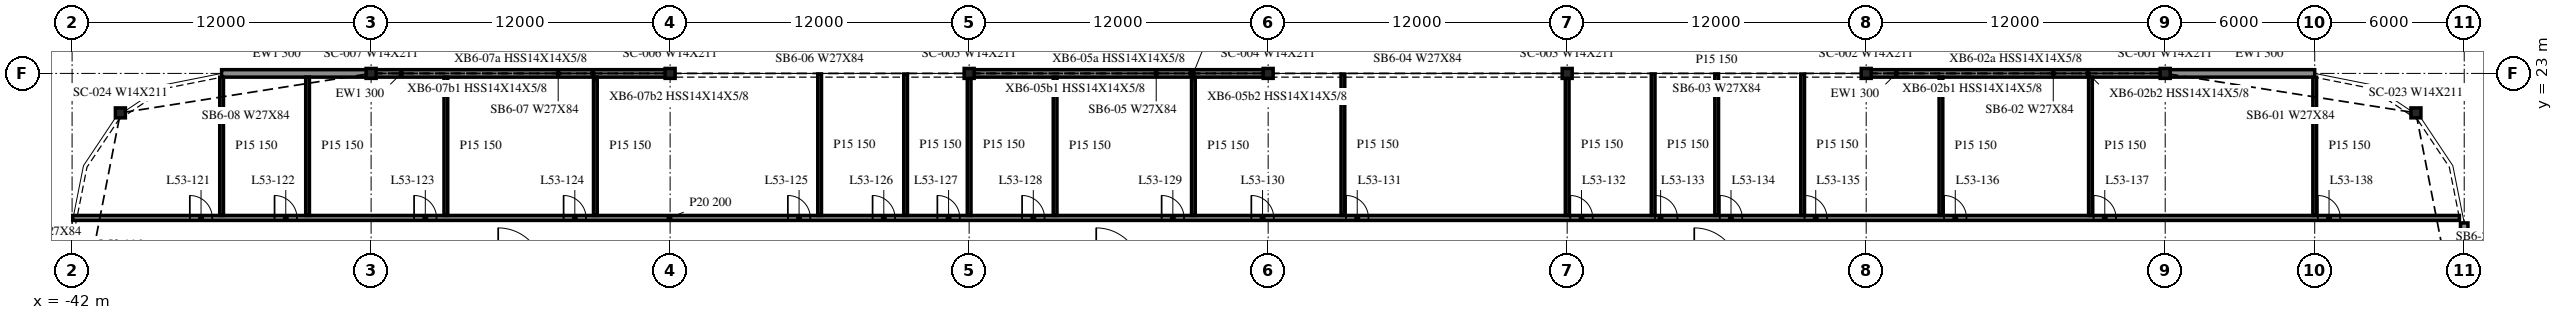
"""IFC4 building model, lengths in metres.
Left out: names, types, materials, properties, quantities, classifications, styles, units other than length and angle.
Written with IfcOpenShell. Run it as: python <this file> out.ifc"""

import sys

from ifc_helpers import new_model, si_unit, direction, frame, frame_2d, origin, origin_2d, place, context, subcontext, project, spatial, rectangle, i_section, extrude, element, fill, save


model = new_model("IFC4")
c1 = context("Model", 3, precision=1e-05, world=origin(), true_north=direction((0.0, 1.0)))
c2 = subcontext(c1, "Body", "Model", "MODEL_VIEW")
j1 = project(units=[si_unit("LENGTHUNIT", "METRE"), si_unit("PLANEANGLEUNIT", "RADIAN")], contexts=[c1])
p1 = place(None, origin())
s1 = spatial("IfcSite", under=j1, at=p1, CompositionType="ELEMENT")
p2 = place(p1, origin())
s2 = spatial("IfcBuilding", under=s1, at=p2, CompositionType="ELEMENT")
p3 = place(p2, frame((0.0, 0.0, 220.5)))
s3 = spatial("IfcBuildingStorey", under=s2, at=p3, CompositionType="ELEMENT", Elevation=220.5)
for number, where, z_axis, x_axis in (
    (1, (52.062, 21.416, -0.34), (0.0, 0.0, 1.0), (1.0, 0.0, 0.0)),
    (2, (42.0, 23.0, -0.34), (0.0, 0.0, 1.0), (1.0, 0.0, 0.0)),
    (3, (30.0, 23.0, -0.34), (0.0, 0.0, 1.0), (1.0, 0.0, 0.0)),
    (4, (18.0, 23.0, -0.34), (0.0, 0.0, 1.0), (1.0, 0.0, 0.0)),
    (5, (6.0, 23.0, -0.34), (0.0, 0.0, 1.0), (1.0, 0.0, 0.0)),
    (6, (-6.0, 23.0, -0.34), (0.0, 0.0, 1.0), (1.0, 0.0, 0.0)),
    (7, (-18.0, 23.0, -0.34), (0.0, 0.0, 1.0), (1.0, 0.0, 0.0)),
    (8, (-30.0, 23.0, -0.34), (0.0, 0.0, 1.0), (1.0, 0.0, 0.0)),
    (9, (-40.062, 21.416, -0.34), (0.0, 0.0, 1.0), (1.0, 0.0, 0.0)),
):
    element("IfcColumn", number, at=place(p3, frame(where, z_axis=z_axis, x_axis=x_axis)), inside=s3, PredefinedType="COLUMN", context=c2, shape_type="SweptSolid", body=[
        extrude(i_section(OverallWidth=0.401, OverallDepth=0.399, WebThickness=0.025, FlangeThickness=0.04, at=origin_2d()), origin(), (0.0, 0.0, 1.0), 3.74),
    ])
p4 = place(p3, frame((48.0, 23.0, 0.0), z_axis=(0.0, 0.0, 1.0), x_axis=(-1.0, 0.0, 0.0)))
e10 = element("IfcWall", 10, at=p4, inside=s3, PredefinedType="NOTDEFINED", context=c2, shape_type="SweptSolid", body=[
    extrude(rectangle(XDim=5.988, YDim=0.3, at=frame_2d((2.994, 0.0))), origin(), (0.0, 0.0, 1.0), 3.4),
])
for number, where, z_axis, x_axis in (
    (11, (41.988, 23.0, 0.0), (0.0, 0.0, 1.0), (-1.0, 0.0, 0.0)),
    (12, (5.988, 23.0, 0.0), (0.0, 0.0, 1.0), (-1.0, 0.0, 0.0)),
    (13, (-18.012, 23.0, 0.0), (0.0, 0.0, 1.0), (-1.0, 0.0, 0.0)),
):
    element("IfcWall", number, at=place(p3, frame(where, z_axis=z_axis, x_axis=x_axis)), inside=s3, PredefinedType="NOTDEFINED", context=c2, shape_type="SweptSolid", body=[
        extrude(rectangle(XDim=11.975, YDim=0.3, at=frame_2d((5.988, 0.0))), origin(), (0.0, 0.0, 1.0), 3.4),
    ])
p5 = place(p3, frame((-30.012, 23.0, 0.0), z_axis=(0.0, 0.0, 1.0), x_axis=(-1.0, 0.0, 0.0)))
e14 = element("IfcWall", 14, at=p5, inside=s3, PredefinedType="NOTDEFINED", context=c2, shape_type="SweptSolid", body=[
    extrude(rectangle(XDim=5.988, YDim=0.3, at=frame_2d((2.994, 0.0))), origin(), (0.0, 0.0, 1.0), 3.4),
])
p6 = place(p3, frame((54.0, 11.7, 0.0), z_axis=(0.0, 0.0, 1.0), x_axis=(0.0, 1.0, 0.0)))
e15 = element("IfcWall", 15, at=p6, inside=s3, PredefinedType="NOTDEFINED", context=c2, shape_type="SweptSolid", body=[
    extrude(rectangle(XDim=5.3, YDim=0.3, at=frame_2d((2.65, 0.0))), origin(), (0.0, 0.0, 1.0), 3.4),
])
p7 = place(p3, frame((-41.975, 17.2, 0.0), z_axis=(0.0, 0.0, 1.0), x_axis=(1.0, 0.0, 0.0)))
e16 = element("IfcWall", 16, at=p7, inside=s3, PredefinedType="PARTITIONING", context=c2, shape_type="SweptSolid", body=[
    extrude(rectangle(XDim=95.782, YDim=0.2, at=frame_2d((47.891, 0.0))), origin(), (0.0, 0.0, 1.0), 3.4),
])
p8 = place(p7, frame((4.7, 0.0, 0.0)))
e17 = element("IfcOpeningElement", 17, at=p8, cuts=e16, PredefinedType="OPENING", context=c2, shape_type="SweptSolid", body=[
    extrude(rectangle(XDim=0.9, YDim=2.1, at=frame_2d((0.45, 1.05))), frame((0.0, 0.11, 0.0), z_axis=(0.0, -1.0, 0.0), x_axis=(1.0, 0.0, 0.0)), (0.0, 0.0, 1.0), 0.22),
])
p9 = place(p7, frame((8.1, 0.0, 0.0)))
e18 = element("IfcOpeningElement", 18, at=p9, cuts=e16, PredefinedType="OPENING", context=c2, shape_type="SweptSolid", body=[
    extrude(rectangle(XDim=0.9, YDim=2.1, at=frame_2d((0.45, 1.05))), frame((0.0, 0.11, 0.0), z_axis=(0.0, -1.0, 0.0), x_axis=(1.0, 0.0, 0.0)), (0.0, 0.0, 1.0), 0.22),
])
p10 = place(p7, frame((13.7, 0.0, 0.0)))
e19 = element("IfcOpeningElement", 19, at=p10, cuts=e16, PredefinedType="OPENING", context=c2, shape_type="SweptSolid", body=[
    extrude(rectangle(XDim=0.9, YDim=2.1, at=frame_2d((0.45, 1.05))), frame((0.0, 0.11, 0.0), z_axis=(0.0, -1.0, 0.0), x_axis=(1.0, 0.0, 0.0)), (0.0, 0.0, 1.0), 0.22),
])
p11 = place(p7, frame((19.7, 0.0, 0.0)))
e20 = element("IfcOpeningElement", 20, at=p11, cuts=e16, PredefinedType="OPENING", context=c2, shape_type="SweptSolid", body=[
    extrude(rectangle(XDim=0.9, YDim=2.1, at=frame_2d((0.45, 1.05))), frame((0.0, 0.11, 0.0), z_axis=(0.0, -1.0, 0.0), x_axis=(1.0, 0.0, 0.0)), (0.0, 0.0, 1.0), 0.22),
])
p12 = place(p7, frame((28.7, 0.0, 0.0)))
e21 = element("IfcOpeningElement", 21, at=p12, cuts=e16, PredefinedType="OPENING", context=c2, shape_type="SweptSolid", body=[
    extrude(rectangle(XDim=0.9, YDim=2.1, at=frame_2d((0.45, 1.05))), frame((0.0, 0.11, 0.0), z_axis=(0.0, -1.0, 0.0), x_axis=(1.0, 0.0, 0.0)), (0.0, 0.0, 1.0), 0.22),
])
p13 = place(p7, frame((32.1, 0.0, 0.0)))
e22 = element("IfcOpeningElement", 22, at=p13, cuts=e16, PredefinedType="OPENING", context=c2, shape_type="SweptSolid", body=[
    extrude(rectangle(XDim=0.9, YDim=2.1, at=frame_2d((0.45, 1.05))), frame((0.0, 0.11, 0.0), z_axis=(0.0, -1.0, 0.0), x_axis=(1.0, 0.0, 0.0)), (0.0, 0.0, 1.0), 0.22),
])
p14 = place(p7, frame((34.7, 0.0, 0.0)))
e23 = element("IfcOpeningElement", 23, at=p14, cuts=e16, PredefinedType="OPENING", context=c2, shape_type="SweptSolid", body=[
    extrude(rectangle(XDim=0.9, YDim=2.1, at=frame_2d((0.45, 1.05))), frame((0.0, 0.11, 0.0), z_axis=(0.0, -1.0, 0.0), x_axis=(1.0, 0.0, 0.0)), (0.0, 0.0, 1.0), 0.22),
])
p15 = place(p7, frame((38.1, 0.0, 0.0)))
e24 = element("IfcOpeningElement", 24, at=p15, cuts=e16, PredefinedType="OPENING", context=c2, shape_type="SweptSolid", body=[
    extrude(rectangle(XDim=0.9, YDim=2.1, at=frame_2d((0.45, 1.05))), frame((0.0, 0.11, 0.0), z_axis=(0.0, -1.0, 0.0), x_axis=(1.0, 0.0, 0.0)), (0.0, 0.0, 1.0), 0.22),
])
p16 = place(p7, frame((43.7, 0.0, 0.0)))
e25 = element("IfcOpeningElement", 25, at=p16, cuts=e16, PredefinedType="OPENING", context=c2, shape_type="SweptSolid", body=[
    extrude(rectangle(XDim=0.9, YDim=2.1, at=frame_2d((0.45, 1.05))), frame((0.0, 0.11, 0.0), z_axis=(0.0, -1.0, 0.0), x_axis=(1.0, 0.0, 0.0)), (0.0, 0.0, 1.0), 0.22),
])
p17 = place(p7, frame((47.3, 0.0, 0.0)))
e26 = element("IfcOpeningElement", 26, at=p17, cuts=e16, PredefinedType="OPENING", context=c2, shape_type="SweptSolid", body=[
    extrude(rectangle(XDim=0.9, YDim=2.1, at=frame_2d((0.45, 1.05))), frame((0.0, 0.11, 0.0), z_axis=(0.0, -1.0, 0.0), x_axis=(1.0, 0.0, 0.0)), (0.0, 0.0, 1.0), 0.22),
])
p18 = place(p7, frame((51.1, 0.0, 0.0)))
e27 = element("IfcOpeningElement", 27, at=p18, cuts=e16, PredefinedType="OPENING", context=c2, shape_type="SweptSolid", body=[
    extrude(rectangle(XDim=0.9, YDim=2.1, at=frame_2d((0.45, 1.05))), frame((0.0, 0.11, 0.0), z_axis=(0.0, -1.0, 0.0), x_axis=(1.0, 0.0, 0.0)), (0.0, 0.0, 1.0), 0.22),
])
p19 = place(p7, frame((60.1, 0.0, 0.0)))
e28 = element("IfcOpeningElement", 28, at=p19, cuts=e16, PredefinedType="OPENING", context=c2, shape_type="SweptSolid", body=[
    extrude(rectangle(XDim=0.9, YDim=2.1, at=frame_2d((0.45, 1.05))), frame((0.0, 0.11, 0.0), z_axis=(0.0, -1.0, 0.0), x_axis=(1.0, 0.0, 0.0)), (0.0, 0.0, 1.0), 0.22),
])
p20 = place(p7, frame((63.5, 0.0, 0.0)))
e29 = element("IfcOpeningElement", 29, at=p20, cuts=e16, PredefinedType="OPENING", context=c2, shape_type="SweptSolid", body=[
    extrude(rectangle(XDim=0.9, YDim=2.1, at=frame_2d((0.45, 1.05))), frame((0.0, 0.11, 0.0), z_axis=(0.0, -1.0, 0.0), x_axis=(1.0, 0.0, 0.0)), (0.0, 0.0, 1.0), 0.22),
])
p21 = place(p7, frame((66.1, 0.0, 0.0)))
e30 = element("IfcOpeningElement", 30, at=p21, cuts=e16, PredefinedType="OPENING", context=c2, shape_type="SweptSolid", body=[
    extrude(rectangle(XDim=0.9, YDim=2.1, at=frame_2d((0.45, 1.05))), frame((0.0, 0.11, 0.0), z_axis=(0.0, -1.0, 0.0), x_axis=(1.0, 0.0, 0.0)), (0.0, 0.0, 1.0), 0.22),
])
p22 = place(p7, frame((69.5, 0.0, 0.0)))
e31 = element("IfcOpeningElement", 31, at=p22, cuts=e16, PredefinedType="OPENING", context=c2, shape_type="SweptSolid", body=[
    extrude(rectangle(XDim=0.9, YDim=2.1, at=frame_2d((0.45, 1.05))), frame((0.0, 0.11, 0.0), z_axis=(0.0, -1.0, 0.0), x_axis=(1.0, 0.0, 0.0)), (0.0, 0.0, 1.0), 0.22),
])
p23 = place(p7, frame((75.1, 0.0, 0.0)))
e32 = element("IfcOpeningElement", 32, at=p23, cuts=e16, PredefinedType="OPENING", context=c2, shape_type="SweptSolid", body=[
    extrude(rectangle(XDim=0.9, YDim=2.1, at=frame_2d((0.45, 1.05))), frame((0.0, 0.11, 0.0), z_axis=(0.0, -1.0, 0.0), x_axis=(1.0, 0.0, 0.0)), (0.0, 0.0, 1.0), 0.22),
])
p24 = place(p7, frame((81.1, 0.0, 0.0)))
e33 = element("IfcOpeningElement", 33, at=p24, cuts=e16, PredefinedType="OPENING", context=c2, shape_type="SweptSolid", body=[
    extrude(rectangle(XDim=0.9, YDim=2.1, at=frame_2d((0.45, 1.05))), frame((0.0, 0.11, 0.0), z_axis=(0.0, -1.0, 0.0), x_axis=(1.0, 0.0, 0.0)), (0.0, 0.0, 1.0), 0.22),
])
p25 = place(p7, frame((90.1, 0.0, 0.0)))
e34 = element("IfcOpeningElement", 34, at=p25, cuts=e16, PredefinedType="OPENING", context=c2, shape_type="SweptSolid", body=[
    extrude(rectangle(XDim=0.9, YDim=2.1, at=frame_2d((0.45, 1.05))), frame((0.0, 0.11, 0.0), z_axis=(0.0, -1.0, 0.0), x_axis=(1.0, 0.0, 0.0)), (0.0, 0.0, 1.0), 0.22),
])
p26 = place(p3, frame((-36.0, 17.3, 0.0), z_axis=(0.0, 0.0, 1.0), x_axis=(0.0, 1.0, 0.0)))
e35 = element("IfcWall", 35, at=p26, inside=s3, PredefinedType="PARTITIONING", context=c2, shape_type="SweptSolid", body=[
    extrude(rectangle(XDim=5.547, YDim=0.15, at=frame_2d((2.773, 0.0))), origin(), (0.0, 0.0, 1.0), 3.4),
])
for number, where, z_axis, x_axis in (
    (36, (-32.55, 17.3, 0.0), (0.0, 0.0, 1.0), (0.0, 1.0, 0.0)),
    (37, (-27.0, 17.3, 0.0), (0.0, 0.0, 1.0), (0.0, 1.0, 0.0)),
    (38, (-21.0, 17.3, 0.0), (0.0, 0.0, 1.0), (0.0, 1.0, 0.0)),
):
    element("IfcWall", number, at=place(p3, frame(where, z_axis=z_axis, x_axis=x_axis)), inside=s3, PredefinedType="PARTITIONING", context=c2, shape_type="SweptSolid", body=[
        extrude(rectangle(XDim=5.55, YDim=0.15, at=frame_2d((2.775, 0.0))), origin(), (0.0, 0.0, 1.0), 3.4),
    ])
for number, where, z_axis, x_axis in (
    (39, (-12.0, 17.3, 0.0), (0.0, 0.0, 1.0), (0.0, 1.0, 0.0)),
    (40, (-8.55, 17.3, 0.0), (0.0, 0.0, 1.0), (0.0, 1.0, 0.0)),
):
    element("IfcWall", number, at=place(p3, frame(where, z_axis=z_axis, x_axis=x_axis)), inside=s3, PredefinedType="PARTITIONING", context=c2, shape_type="SweptSolid", body=[
        extrude(rectangle(XDim=5.675, YDim=0.15, at=frame_2d((2.837, 0.0))), origin(), (0.0, 0.0, 1.0), 3.4),
    ])
p27 = place(p3, frame((-6.0, 17.3, 0.0), z_axis=(0.0, 0.0, 1.0), x_axis=(0.0, 1.0, 0.0)))
e41 = element("IfcWall", 41, at=p27, inside=s3, PredefinedType="PARTITIONING", context=c2, shape_type="SweptSolid", body=[
    extrude(rectangle(XDim=5.675, YDim=0.15, at=frame_2d((2.837, 0.0))), origin(), (0.0, 0.0, 1.0), 2.401),
])
for number, where, z_axis, x_axis in (
    (42, (-2.55, 17.3, 0.0), (0.0, 0.0, 1.0), (0.0, 1.0, 0.0)),
    (43, (3.0, 17.3, 0.0), (0.0, 0.0, 1.0), (0.0, 1.0, 0.0)),
):
    element("IfcWall", number, at=place(p3, frame(where, z_axis=z_axis, x_axis=x_axis)), inside=s3, PredefinedType="PARTITIONING", context=c2, shape_type="SweptSolid", body=[
        extrude(rectangle(XDim=5.55, YDim=0.15, at=frame_2d((2.775, 0.0))), origin(), (0.0, 0.0, 1.0), 3.4),
    ])
p28 = place(p3, frame((9.0, 17.3, 0.0), z_axis=(0.0, 0.0, 1.0), x_axis=(0.0, 1.0, 0.0)))
e44 = element("IfcWall", 44, at=p28, inside=s3, PredefinedType="PARTITIONING", context=c2, shape_type="SweptSolid", body=[
    extrude(rectangle(XDim=5.675, YDim=0.15, at=frame_2d((2.837, 0.0))), origin(), (0.0, 0.0, 1.0), 3.4),
])
p29 = place(p3, frame((18.0, 17.3, 0.0), z_axis=(0.0, 0.0, 1.0), x_axis=(0.0, 1.0, 0.0)))
e45 = element("IfcWall", 45, at=p29, inside=s3, PredefinedType="PARTITIONING", context=c2, shape_type="SweptSolid", body=[
    extrude(rectangle(XDim=5.675, YDim=0.15, at=frame_2d((2.837, 0.0))), origin(), (0.0, 0.0, 1.0), 2.401),
])
for number, where, z_axis, x_axis in (
    (46, (21.45, 17.3, 0.0), (0.0, 0.0, 1.0), (0.0, 1.0, 0.0)),
    (47, (24.0, 17.3, 0.0), (0.0, 0.0, 1.0), (0.0, 1.0, 0.0)),
    (48, (27.45, 17.3, 0.0), (0.0, 0.0, 1.0), (0.0, 1.0, 0.0)),
):
    element("IfcWall", number, at=place(p3, frame(where, z_axis=z_axis, x_axis=x_axis)), inside=s3, PredefinedType="PARTITIONING", context=c2, shape_type="SweptSolid", body=[
        extrude(rectangle(XDim=5.675, YDim=0.15, at=frame_2d((2.837, 0.0))), origin(), (0.0, 0.0, 1.0), 3.4),
    ])
for number, where, z_axis, x_axis in (
    (49, (33.0, 17.3, 0.0), (0.0, 0.0, 1.0), (0.0, 1.0, 0.0)),
    (50, (39.0, 17.3, 0.0), (0.0, 0.0, 1.0), (0.0, 1.0, 0.0)),
):
    element("IfcWall", number, at=place(p3, frame(where, z_axis=z_axis, x_axis=x_axis)), inside=s3, PredefinedType="PARTITIONING", context=c2, shape_type="SweptSolid", body=[
        extrude(rectangle(XDim=5.55, YDim=0.15, at=frame_2d((2.775, 0.0))), origin(), (0.0, 0.0, 1.0), 3.4),
    ])
p30 = place(p3, frame((48.0, 17.3, 0.0), z_axis=(0.0, 0.0, 1.0), x_axis=(0.0, 1.0, 0.0)))
e51 = element("IfcWall", 51, at=p30, inside=s3, PredefinedType="PARTITIONING", context=c2, shape_type="SweptSolid", body=[
    extrude(rectangle(XDim=5.547, YDim=0.15, at=frame_2d((2.773, 0.0))), origin(), (0.0, 0.0, 1.0), 3.4),
])
p31 = place(p8, origin())
e52 = element("IfcDoor", 52, at=p31, inside=s3, OperationType="SINGLE_SWING_LEFT", PredefinedType="DOOR", context=c2, shape_type="SweptSolid", body=[
    extrude(rectangle(XDim=0.9, YDim=2.1, at=frame_2d((0.45, 1.05))), frame((0.0, 0.025, 0.0), z_axis=(0.0, -1.0, 0.0), x_axis=(1.0, 0.0, 0.0)), (0.0, 0.0, 1.0), 0.05),
])
fill(e17, e52)
p32 = place(p9, origin())
e53 = element("IfcDoor", 53, at=p32, inside=s3, OperationType="SINGLE_SWING_LEFT", PredefinedType="DOOR", context=c2, shape_type="SweptSolid", body=[
    extrude(rectangle(XDim=0.9, YDim=2.1, at=frame_2d((0.45, 1.05))), frame((0.0, 0.025, 0.0), z_axis=(0.0, -1.0, 0.0), x_axis=(1.0, 0.0, 0.0)), (0.0, 0.0, 1.0), 0.05),
])
fill(e18, e53)
p33 = place(p10, origin())
e54 = element("IfcDoor", 54, at=p33, inside=s3, OperationType="SINGLE_SWING_LEFT", PredefinedType="DOOR", context=c2, shape_type="SweptSolid", body=[
    extrude(rectangle(XDim=0.9, YDim=2.1, at=frame_2d((0.45, 1.05))), frame((0.0, 0.025, 0.0), z_axis=(0.0, -1.0, 0.0), x_axis=(1.0, 0.0, 0.0)), (0.0, 0.0, 1.0), 0.05),
])
fill(e19, e54)
p34 = place(p11, origin())
e55 = element("IfcDoor", 55, at=p34, inside=s3, OperationType="SINGLE_SWING_LEFT", PredefinedType="DOOR", context=c2, shape_type="SweptSolid", body=[
    extrude(rectangle(XDim=0.9, YDim=2.1, at=frame_2d((0.45, 1.05))), frame((0.0, 0.025, 0.0), z_axis=(0.0, -1.0, 0.0), x_axis=(1.0, 0.0, 0.0)), (0.0, 0.0, 1.0), 0.05),
])
fill(e20, e55)
p35 = place(p12, origin())
e56 = element("IfcDoor", 56, at=p35, inside=s3, OperationType="SINGLE_SWING_LEFT", PredefinedType="DOOR", context=c2, shape_type="SweptSolid", body=[
    extrude(rectangle(XDim=0.9, YDim=2.1, at=frame_2d((0.45, 1.05))), frame((0.0, 0.025, 0.0), z_axis=(0.0, -1.0, 0.0), x_axis=(1.0, 0.0, 0.0)), (0.0, 0.0, 1.0), 0.05),
])
fill(e21, e56)
p36 = place(p13, origin())
e57 = element("IfcDoor", 57, at=p36, inside=s3, OperationType="SINGLE_SWING_LEFT", PredefinedType="DOOR", context=c2, shape_type="SweptSolid", body=[
    extrude(rectangle(XDim=0.9, YDim=2.1, at=frame_2d((0.45, 1.05))), frame((0.0, 0.025, 0.0), z_axis=(0.0, -1.0, 0.0), x_axis=(1.0, 0.0, 0.0)), (0.0, 0.0, 1.0), 0.05),
])
fill(e22, e57)
p37 = place(p14, origin())
e58 = element("IfcDoor", 58, at=p37, inside=s3, OperationType="SINGLE_SWING_LEFT", PredefinedType="DOOR", context=c2, shape_type="SweptSolid", body=[
    extrude(rectangle(XDim=0.9, YDim=2.1, at=frame_2d((0.45, 1.05))), frame((0.0, 0.025, 0.0), z_axis=(0.0, -1.0, 0.0), x_axis=(1.0, 0.0, 0.0)), (0.0, 0.0, 1.0), 0.05),
])
fill(e23, e58)
p38 = place(p15, origin())
e59 = element("IfcDoor", 59, at=p38, inside=s3, OperationType="SINGLE_SWING_LEFT", PredefinedType="DOOR", context=c2, shape_type="SweptSolid", body=[
    extrude(rectangle(XDim=0.9, YDim=2.1, at=frame_2d((0.45, 1.05))), frame((0.0, 0.025, 0.0), z_axis=(0.0, -1.0, 0.0), x_axis=(1.0, 0.0, 0.0)), (0.0, 0.0, 1.0), 0.05),
])
fill(e24, e59)
p39 = place(p16, origin())
e60 = element("IfcDoor", 60, at=p39, inside=s3, OperationType="SINGLE_SWING_LEFT", PredefinedType="DOOR", context=c2, shape_type="SweptSolid", body=[
    extrude(rectangle(XDim=0.9, YDim=2.1, at=frame_2d((0.45, 1.05))), frame((0.0, 0.025, 0.0), z_axis=(0.0, -1.0, 0.0), x_axis=(1.0, 0.0, 0.0)), (0.0, 0.0, 1.0), 0.05),
])
fill(e25, e60)
p40 = place(p17, origin())
e61 = element("IfcDoor", 61, at=p40, inside=s3, OperationType="SINGLE_SWING_LEFT", PredefinedType="DOOR", context=c2, shape_type="SweptSolid", body=[
    extrude(rectangle(XDim=0.9, YDim=2.1, at=frame_2d((0.45, 1.05))), frame((0.0, 0.025, 0.0), z_axis=(0.0, -1.0, 0.0), x_axis=(1.0, 0.0, 0.0)), (0.0, 0.0, 1.0), 0.05),
])
fill(e26, e61)
p41 = place(p18, origin())
e62 = element("IfcDoor", 62, at=p41, inside=s3, OperationType="SINGLE_SWING_RIGHT", PredefinedType="DOOR", context=c2, shape_type="SweptSolid", body=[
    extrude(rectangle(XDim=0.9, YDim=2.1, at=frame_2d((0.45, 1.05))), frame((0.0, 0.025, 0.0), z_axis=(0.0, -1.0, 0.0), x_axis=(1.0, 0.0, 0.0)), (0.0, 0.0, 1.0), 0.05),
])
fill(e27, e62)
p42 = place(p19, origin())
e63 = element("IfcDoor", 63, at=p42, inside=s3, OperationType="SINGLE_SWING_RIGHT", PredefinedType="DOOR", context=c2, shape_type="SweptSolid", body=[
    extrude(rectangle(XDim=0.9, YDim=2.1, at=frame_2d((0.45, 1.05))), frame((0.0, 0.025, 0.0), z_axis=(0.0, -1.0, 0.0), x_axis=(1.0, 0.0, 0.0)), (0.0, 0.0, 1.0), 0.05),
])
fill(e28, e63)
p43 = place(p20, origin())
e64 = element("IfcDoor", 64, at=p43, inside=s3, OperationType="SINGLE_SWING_RIGHT", PredefinedType="DOOR", context=c2, shape_type="SweptSolid", body=[
    extrude(rectangle(XDim=0.9, YDim=2.1, at=frame_2d((0.45, 1.05))), frame((0.0, 0.025, 0.0), z_axis=(0.0, -1.0, 0.0), x_axis=(1.0, 0.0, 0.0)), (0.0, 0.0, 1.0), 0.05),
])
fill(e29, e64)
p44 = place(p21, origin())
e65 = element("IfcDoor", 65, at=p44, inside=s3, OperationType="SINGLE_SWING_RIGHT", PredefinedType="DOOR", context=c2, shape_type="SweptSolid", body=[
    extrude(rectangle(XDim=0.9, YDim=2.1, at=frame_2d((0.45, 1.05))), frame((0.0, 0.025, 0.0), z_axis=(0.0, -1.0, 0.0), x_axis=(1.0, 0.0, 0.0)), (0.0, 0.0, 1.0), 0.05),
])
fill(e30, e65)
p45 = place(p22, origin())
e66 = element("IfcDoor", 66, at=p45, inside=s3, OperationType="SINGLE_SWING_RIGHT", PredefinedType="DOOR", context=c2, shape_type="SweptSolid", body=[
    extrude(rectangle(XDim=0.9, YDim=2.1, at=frame_2d((0.45, 1.05))), frame((0.0, 0.025, 0.0), z_axis=(0.0, -1.0, 0.0), x_axis=(1.0, 0.0, 0.0)), (0.0, 0.0, 1.0), 0.05),
])
fill(e31, e66)
p46 = place(p23, origin())
e67 = element("IfcDoor", 67, at=p46, inside=s3, OperationType="SINGLE_SWING_RIGHT", PredefinedType="DOOR", context=c2, shape_type="SweptSolid", body=[
    extrude(rectangle(XDim=0.9, YDim=2.1, at=frame_2d((0.45, 1.05))), frame((0.0, 0.025, 0.0), z_axis=(0.0, -1.0, 0.0), x_axis=(1.0, 0.0, 0.0)), (0.0, 0.0, 1.0), 0.05),
])
fill(e32, e67)
p47 = place(p24, origin())
e68 = element("IfcDoor", 68, at=p47, inside=s3, OperationType="SINGLE_SWING_RIGHT", PredefinedType="DOOR", context=c2, shape_type="SweptSolid", body=[
    extrude(rectangle(XDim=0.9, YDim=2.1, at=frame_2d((0.45, 1.05))), frame((0.0, 0.025, 0.0), z_axis=(0.0, -1.0, 0.0), x_axis=(1.0, 0.0, 0.0)), (0.0, 0.0, 1.0), 0.05),
])
fill(e33, e68)
p48 = place(p25, origin())
e69 = element("IfcDoor", 69, at=p48, inside=s3, OperationType="SINGLE_SWING_RIGHT", PredefinedType="DOOR", context=c2, shape_type="SweptSolid", body=[
    extrude(rectangle(XDim=0.9, YDim=2.1, at=frame_2d((0.45, 1.05))), frame((0.0, 0.025, 0.0), z_axis=(0.0, -1.0, 0.0), x_axis=(1.0, 0.0, 0.0)), (0.0, 0.0, 1.0), 0.05),
])
fill(e34, e69)
save(model, sys.argv[1])
